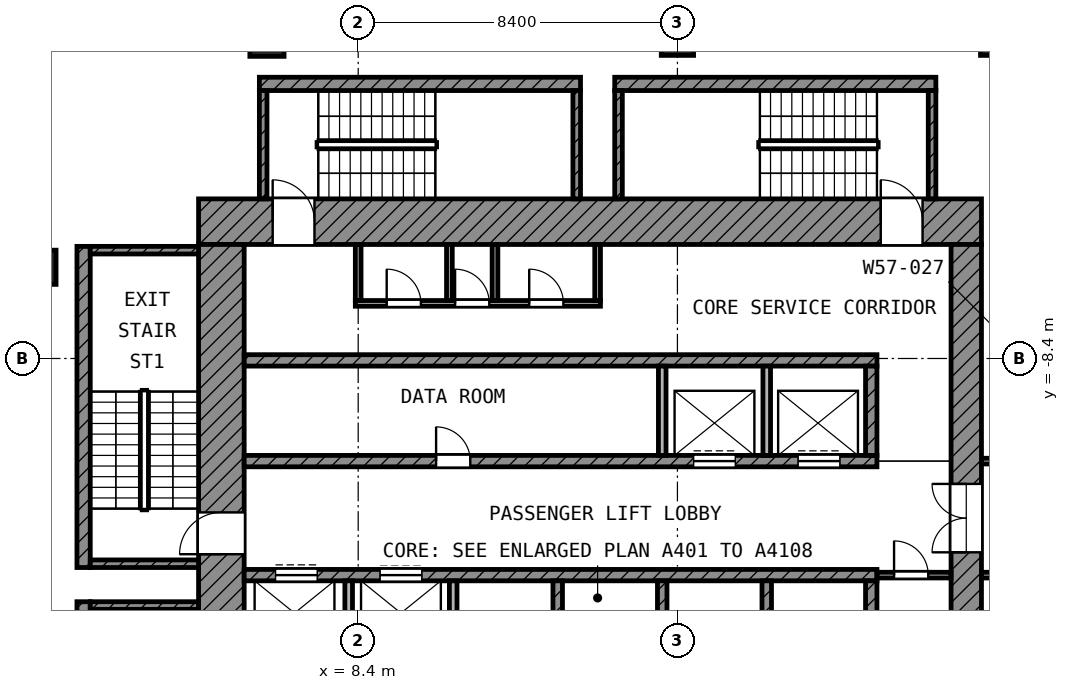
"""IFC4 building model, lengths in metres.
Left out: names, types, materials, properties, quantities, classifications, styles, units other than length and angle.
Written with IfcOpenShell. Run it as: python <this file> out.ifc"""

import sys

from ifc_helpers import new_model, si_unit, direction, frame, frame_2d, origin, origin_2d, place, context, subcontext, project, spatial, rectangle, extrude, element, fill, save


model = new_model("IFC4")
c1 = context("Model", 3, precision=1e-05, world=origin(), true_north=direction((0.0, 1.0)))
c2 = subcontext(c1, "Body", "Model", "MODEL_VIEW")
j1 = project(units=[si_unit("LENGTHUNIT", "METRE"), si_unit("PLANEANGLEUNIT", "RADIAN")], contexts=[c1])
p1 = place(None, origin())
s1 = spatial("IfcSite", under=j1, at=p1, CompositionType="ELEMENT")
p2 = place(p1, origin())
s2 = spatial("IfcBuilding", under=s1, at=p2, CompositionType="ELEMENT")
p3 = place(p2, frame((0.0, 0.0, 247.4)))
s3 = spatial("IfcBuildingStorey", under=s2, at=p3, CompositionType="ELEMENT", Elevation=247.4)
p4 = place(p3, frame((6.0, 0.0, 0.0), z_axis=(0.0, 0.0, 1.0), x_axis=(1.0, 0.0, 0.0)))
e1 = element("IfcColumn", 1, at=p4, inside=s3, PredefinedType="COLUMN", context=c2, shape_type="SweptSolid", body=[
    extrude(rectangle(XDim=0.9, YDim=0.9, at=origin_2d()), origin(), (0.0, 0.0, 1.0), 4.2),
])
for number, where, z_axis, x_axis in (
    (2, (16.8, 0.0, 0.0), (0.0, 0.0, 1.0), (1.0, 0.0, 0.0)),
    (3, (25.2, 0.0, 0.0), (0.0, 0.0, 1.0), (1.0, 0.0, 0.0)),
):
    element("IfcColumn", number, at=place(p3, frame(where, z_axis=z_axis, x_axis=x_axis)), inside=s3, PredefinedType="COLUMN", context=c2, shape_type="SweptSolid", body=[
        extrude(rectangle(XDim=0.85, YDim=0.85, at=origin_2d()), origin(), (0.0, 0.0, 1.0), 4.2),
    ])
p5 = place(p3, frame((0.0, -6.0, 0.0), z_axis=(0.0, 0.0, 1.0), x_axis=(1.0, 0.0, 0.0)))
e4 = element("IfcColumn", 4, at=p5, inside=s3, PredefinedType="COLUMN", context=c2, shape_type="SweptSolid", body=[
    extrude(rectangle(XDim=0.9, YDim=0.9, at=origin_2d()), origin(), (0.0, 0.0, 1.0), 4.2),
])
p6 = place(p3, frame((4.2, -4.8, 0.0), z_axis=(0.0, 0.0, 1.0), x_axis=(1.0, 0.0, 0.0)))
e5 = element("IfcWall", 5, at=p6, inside=s3, PredefinedType="SHEAR", context=c2, shape_type="SweptSolid", body=[
    extrude(rectangle(XDim=20.6, YDim=1.2, at=frame_2d((10.3, 0.0))), origin(), (0.0, 0.0, 1.0), 3.6),
])
p7 = place(p6, frame((1.95, 0.0, 0.0)))
e6 = element("IfcOpeningElement", 6, at=p7, cuts=e5, PredefinedType="OPENING", context=c2, shape_type="SweptSolid", body=[
    extrude(rectangle(XDim=1.1, YDim=2.1, at=frame_2d((0.55, 1.05))), frame((0.0, 0.61, 0.0), z_axis=(0.0, -1.0, 0.0), x_axis=(1.0, 0.0, 0.0)), (0.0, 0.0, 1.0), 1.22),
])
p8 = place(p6, frame((17.95, 0.0, 0.0)))
e7 = element("IfcOpeningElement", 7, at=p8, cuts=e5, PredefinedType="OPENING", context=c2, shape_type="SweptSolid", body=[
    extrude(rectangle(XDim=1.1, YDim=2.1, at=frame_2d((0.55, 1.05))), frame((0.0, 0.61, 0.0), z_axis=(0.0, -1.0, 0.0), x_axis=(1.0, 0.0, 0.0)), (0.0, 0.0, 1.0), 1.22),
])
p9 = place(p3, frame((4.8, -24.8, 0.0), z_axis=(0.0, 0.0, 1.0), x_axis=(0.0, 1.0, 0.0)))
e8 = element("IfcWall", 8, at=p9, inside=s3, PredefinedType="SHEAR", context=c2, shape_type="SweptSolid", body=[
    extrude(rectangle(XDim=19.4, YDim=1.2, at=frame_2d((9.7, 0.0))), origin(), (0.0, 0.0, 1.0), 3.6),
])
p10 = place(p9, frame((11.25, 0.0, 0.0)))
e9 = element("IfcOpeningElement", 9, at=p10, cuts=e8, PredefinedType="OPENING", context=c2, shape_type="SweptSolid", body=[
    extrude(rectangle(XDim=1.1, YDim=2.1, at=frame_2d((0.55, 1.05))), frame((0.0, 0.61, 0.0), z_axis=(0.0, -1.0, 0.0), x_axis=(1.0, 0.0, 0.0)), (0.0, 0.0, 1.0), 1.22),
])
p11 = place(p9, frame((1.95, 0.0, 0.0)))
e10 = element("IfcOpeningElement", 10, at=p11, cuts=e8, PredefinedType="OPENING", context=c2, shape_type="SweptSolid", body=[
    extrude(rectangle(XDim=1.1, YDim=2.1, at=frame_2d((0.55, 1.05))), frame((0.0, 0.61, 0.0), z_axis=(0.0, -1.0, 0.0), x_axis=(1.0, 0.0, 0.0)), (0.0, 0.0, 1.0), 1.22),
])
p12 = place(p3, frame((24.4, -24.0, 0.0), z_axis=(0.0, 0.0, 1.0), x_axis=(0.0, 1.0, 0.0)))
e11 = element("IfcWall", 11, at=p12, inside=s3, PredefinedType="SHEAR", context=c2, shape_type="SweptSolid", body=[
    extrude(rectangle(XDim=18.6, YDim=0.8, at=frame_2d((9.3, 0.0))), origin(), (0.0, 0.0, 1.0), 3.6),
])
p13 = place(p12, frame((10.5, 0.0, 0.0)))
e12 = element("IfcOpeningElement", 12, at=p13, cuts=e11, PredefinedType="OPENING", context=c2, shape_type="SweptSolid", body=[
    extrude(rectangle(XDim=1.8, YDim=2.1, at=frame_2d((0.9, 1.05))), frame((0.0, 0.41, 0.0), z_axis=(0.0, -1.0, 0.0), x_axis=(1.0, 0.0, 0.0)), (0.0, 0.0, 1.0), 0.82),
])
p14 = place(p3, frame((5.4, -8.45, 0.0), z_axis=(0.0, 0.0, 1.0), x_axis=(1.0, 0.0, 0.0)))
e13 = element("IfcWall", 13, at=p14, inside=s3, PredefinedType="SHEAR", context=c2, shape_type="SweptSolid", body=[
    extrude(rectangle(XDim=16.65, YDim=0.3, at=frame_2d((8.325, 0.0))), origin(), (0.0, 0.0, 1.0), 3.6),
])
p15 = place(p3, frame((5.4, -11.1, 0.0), z_axis=(0.0, 0.0, 1.0), x_axis=(1.0, 0.0, 0.0)))
e14 = element("IfcWall", 14, at=p15, inside=s3, PredefinedType="SHEAR", context=c2, shape_type="SweptSolid", body=[
    extrude(rectangle(XDim=16.65, YDim=0.3, at=frame_2d((8.325, 0.0))), origin(), (0.0, 0.0, 1.0), 3.6),
])
p16 = place(p15, frame((11.825, 0.0, 0.0)))
e15 = element("IfcOpeningElement", 15, at=p16, cuts=e14, PredefinedType="OPENING", context=c2, shape_type="SweptSolid", body=[
    extrude(rectangle(XDim=1.1, YDim=2.1, at=frame_2d((0.55, 1.05))), frame((0.0, 0.16, 0.0), z_axis=(0.0, -1.0, 0.0), x_axis=(1.0, 0.0, 0.0)), (0.0, 0.0, 1.0), 0.32),
])
p17 = place(p15, frame((14.575, 0.0, 0.0)))
e16 = element("IfcOpeningElement", 16, at=p17, cuts=e14, PredefinedType="OPENING", context=c2, shape_type="SweptSolid", body=[
    extrude(rectangle(XDim=1.1, YDim=2.1, at=frame_2d((0.55, 1.05))), frame((0.0, 0.16, 0.0), z_axis=(0.0, -1.0, 0.0), x_axis=(1.0, 0.0, 0.0)), (0.0, 0.0, 1.0), 0.32),
])
p18 = place(p15, frame((5.05, 0.0, 0.0)))
e17 = element("IfcOpeningElement", 17, at=p18, cuts=e14, PredefinedType="OPENING", context=c2, shape_type="SweptSolid", body=[
    extrude(rectangle(XDim=0.9, YDim=2.1, at=frame_2d((0.45, 1.05))), frame((0.0, 0.16, 0.0), z_axis=(0.0, -1.0, 0.0), x_axis=(1.0, 0.0, 0.0)), (0.0, 0.0, 1.0), 0.32),
])
p19 = place(p3, frame((5.4, -14.1, 0.0), z_axis=(0.0, 0.0, 1.0), x_axis=(1.0, 0.0, 0.0)))
e18 = element("IfcWall", 18, at=p19, inside=s3, PredefinedType="SHEAR", context=c2, shape_type="SweptSolid", body=[
    extrude(rectangle(XDim=16.65, YDim=0.3, at=frame_2d((8.325, 0.0))), origin(), (0.0, 0.0, 1.0), 3.6),
])
p20 = place(p19, frame((0.825, 0.0, 0.0)))
e19 = element("IfcOpeningElement", 19, at=p20, cuts=e18, PredefinedType="OPENING", context=c2, shape_type="SweptSolid", body=[
    extrude(rectangle(XDim=1.1, YDim=2.1, at=frame_2d((0.55, 1.05))), frame((0.0, 0.16, 0.0), z_axis=(0.0, -1.0, 0.0), x_axis=(1.0, 0.0, 0.0)), (0.0, 0.0, 1.0), 0.32),
])
p21 = place(p19, frame((3.575, 0.0, 0.0)))
e20 = element("IfcOpeningElement", 20, at=p21, cuts=e18, PredefinedType="OPENING", context=c2, shape_type="SweptSolid", body=[
    extrude(rectangle(XDim=1.1, YDim=2.1, at=frame_2d((0.55, 1.05))), frame((0.0, 0.16, 0.0), z_axis=(0.0, -1.0, 0.0), x_axis=(1.0, 0.0, 0.0)), (0.0, 0.0, 1.0), 0.32),
])
p22 = place(p3, frame((21.9, -10.95, 0.0), z_axis=(0.0, 0.0, 1.0), x_axis=(0.0, 1.0, 0.0)))
e21 = element("IfcWall", 21, at=p22, inside=s3, PredefinedType="SHEAR", context=c2, shape_type="SweptSolid", body=[
    extrude(rectangle(XDim=2.35, YDim=0.3, at=frame_2d((1.175, 0.0))), origin(), (0.0, 0.0, 1.0), 3.6),
])
p23 = place(p3, frame((21.9, -16.6, 0.0), z_axis=(0.0, 0.0, 1.0), x_axis=(0.0, 1.0, 0.0)))
e22 = element("IfcWall", 22, at=p23, inside=s3, PredefinedType="SHEAR", context=c2, shape_type="SweptSolid", body=[
    extrude(rectangle(XDim=2.35, YDim=0.3, at=frame_2d((1.175, 0.0))), origin(), (0.0, 0.0, 1.0), 3.6),
])
for number, where, z_axis, x_axis in (
    (23, (16.4, -10.95, 0.0), (0.0, 0.0, 1.0), (0.0, 1.0, 0.0)),
    (24, (19.15, -10.95, 0.0), (0.0, 0.0, 1.0), (0.0, 1.0, 0.0)),
):
    element("IfcWall", number, at=place(p3, frame(where, z_axis=z_axis, x_axis=x_axis)), inside=s3, PredefinedType="PARTITIONING", context=c2, shape_type="SweptSolid", body=[
        extrude(rectangle(XDim=2.35, YDim=0.2, at=frame_2d((1.175, 0.0))), origin(), (0.0, 0.0, 1.0), 3.6),
    ])
for number, where, z_axis, x_axis in (
    (25, (8.15, -16.6, 0.0), (0.0, 0.0, 1.0), (0.0, 1.0, 0.0)),
    (26, (10.9, -16.6, 0.0), (0.0, 0.0, 1.0), (0.0, 1.0, 0.0)),
):
    element("IfcWall", number, at=place(p3, frame(where, z_axis=z_axis, x_axis=x_axis)), inside=s3, PredefinedType="PARTITIONING", context=c2, shape_type="SweptSolid", body=[
        extrude(rectangle(XDim=2.35, YDim=0.2, at=frame_2d((1.175, 0.0))), origin(), (0.0, 0.0, 1.0), 3.6),
    ])
for number, where, z_axis, x_axis in (
    (27, (13.65, -16.6, 0.0), (0.0, 0.0, 1.0), (0.0, 1.0, 0.0)),
    (28, (16.4, -16.6, 0.0), (0.0, 0.0, 1.0), (0.0, 1.0, 0.0)),
    (29, (19.15, -16.6, 0.0), (0.0, 0.0, 1.0), (0.0, 1.0, 0.0)),
):
    element("IfcWall", number, at=place(p3, frame(where, z_axis=z_axis, x_axis=x_axis)), inside=s3, PredefinedType="SHEAR", context=c2, shape_type="SweptSolid", body=[
        extrude(rectangle(XDim=2.35, YDim=0.25, at=frame_2d((1.175, 0.0))), origin(), (0.0, 0.0, 1.0), 3.6),
    ])
p24 = place(p3, frame((22.05, -14.1, 0.0), z_axis=(0.0, 0.0, 1.0), x_axis=(1.0, 0.0, 0.0)))
e30 = element("IfcWall", 30, at=p24, inside=s3, PredefinedType="PARTITIONING", context=c2, shape_type="SweptSolid", body=[
    extrude(rectangle(XDim=1.95, YDim=0.15, at=frame_2d((0.975, 0.0))), origin(), (0.0, 0.0, 1.0), 3.6),
])
p25 = place(p24, frame((0.45, 0.0, 0.0)))
e31 = element("IfcOpeningElement", 31, at=p25, cuts=e30, PredefinedType="OPENING", context=c2, shape_type="SweptSolid", body=[
    extrude(rectangle(XDim=0.9, YDim=2.1, at=frame_2d((0.45, 1.05))), frame((0.0, 0.085, 0.0), z_axis=(0.0, -1.0, 0.0), x_axis=(1.0, 0.0, 0.0)), (0.0, 0.0, 1.0), 0.17),
])
p26 = place(p3, frame((8.325, -6.95, 0.0), z_axis=(0.0, 0.0, 1.0), x_axis=(1.0, 0.0, 0.0)))
e32 = element("IfcWall", 32, at=p26, inside=s3, PredefinedType="PARTITIONING", context=c2, shape_type="SweptSolid", body=[
    extrude(rectangle(XDim=6.45, YDim=0.15, at=frame_2d((3.225, 0.0))), origin(), (0.0, 0.0, 1.0), 3.6),
])
p27 = place(p26, frame((0.825, 0.0, 0.0)))
e33 = element("IfcOpeningElement", 33, at=p27, cuts=e32, PredefinedType="OPENING", context=c2, shape_type="SweptSolid", body=[
    extrude(rectangle(XDim=0.9, YDim=2.1, at=frame_2d((0.45, 1.05))), frame((0.0, 0.085, 0.0), z_axis=(0.0, -1.0, 0.0), x_axis=(1.0, 0.0, 0.0)), (0.0, 0.0, 1.0), 0.17),
])
p28 = place(p26, frame((2.625, 0.0, 0.0)))
e34 = element("IfcOpeningElement", 34, at=p28, cuts=e32, PredefinedType="OPENING", context=c2, shape_type="SweptSolid", body=[
    extrude(rectangle(XDim=0.9, YDim=2.1, at=frame_2d((0.45, 1.05))), frame((0.0, 0.085, 0.0), z_axis=(0.0, -1.0, 0.0), x_axis=(1.0, 0.0, 0.0)), (0.0, 0.0, 1.0), 0.17),
])
p29 = place(p26, frame((4.575, 0.0, 0.0)))
e35 = element("IfcOpeningElement", 35, at=p29, cuts=e32, PredefinedType="OPENING", context=c2, shape_type="SweptSolid", body=[
    extrude(rectangle(XDim=0.9, YDim=2.1, at=frame_2d((0.45, 1.05))), frame((0.0, 0.085, 0.0), z_axis=(0.0, -1.0, 0.0), x_axis=(1.0, 0.0, 0.0)), (0.0, 0.0, 1.0), 0.17),
])
for number, where, z_axis, x_axis in (
    (36, (8.4, -6.875, 0.0), (0.0, 0.0, 1.0), (0.0, 1.0, 0.0)),
    (37, (10.8, -6.875, 0.0), (0.0, 0.0, 1.0), (0.0, 1.0, 0.0)),
    (38, (12.0, -6.875, 0.0), (0.0, 0.0, 1.0), (0.0, 1.0, 0.0)),
    (39, (14.7, -6.875, 0.0), (0.0, 0.0, 1.0), (0.0, 1.0, 0.0)),
):
    element("IfcWall", number, at=place(p3, frame(where, z_axis=z_axis, x_axis=x_axis)), inside=s3, PredefinedType="PARTITIONING", context=c2, shape_type="SweptSolid", body=[
        extrude(rectangle(XDim=1.475, YDim=0.15, at=frame_2d((0.738, 0.0))), origin(), (0.0, 0.0, 1.0), 3.6),
    ])
p30 = place(p3, frame((1.175, -13.9, 0.0), z_axis=(0.0, 0.0, 1.0), x_axis=(0.0, 1.0, 0.0)))
e40 = element("IfcWall", 40, at=p30, inside=s3, PredefinedType="SHEAR", context=c2, shape_type="SweptSolid", body=[
    extrude(rectangle(XDim=8.45, YDim=0.35, at=frame_2d((4.225, 0.0))), origin(), (0.0, 0.0, 1.0), 3.6),
])
for number, where, z_axis, x_axis in (
    (41, (1.35, -5.55, 0.0), (0.0, 0.0, 1.0), (1.0, 0.0, 0.0)),
    (42, (1.35, -13.8, 0.0), (0.0, 0.0, 1.0), (1.0, 0.0, 0.0)),
):
    element("IfcWall", number, at=place(p3, frame(where, z_axis=z_axis, x_axis=x_axis)), inside=s3, PredefinedType="SHEAR", context=c2, shape_type="SweptSolid", body=[
        extrude(rectangle(XDim=2.85, YDim=0.2, at=frame_2d((1.425, 0.0))), origin(), (0.0, 0.0, 1.0), 3.6),
    ])
p31 = place(p3, frame((1.175, -23.25, 0.0), z_axis=(0.0, 0.0, 1.0), x_axis=(0.0, 1.0, 0.0)))
e43 = element("IfcWall", 43, at=p31, inside=s3, PredefinedType="SHEAR", context=c2, shape_type="SweptSolid", body=[
    extrude(rectangle(XDim=8.45, YDim=0.35, at=frame_2d((4.225, 0.0))), origin(), (0.0, 0.0, 1.0), 3.6),
])
p32 = place(p3, frame((1.35, -14.9, 0.0), z_axis=(0.0, 0.0, 1.0), x_axis=(1.0, 0.0, 0.0)))
e44 = element("IfcWall", 44, at=p32, inside=s3, PredefinedType="SHEAR", context=c2, shape_type="SweptSolid", body=[
    extrude(rectangle(XDim=2.85, YDim=0.2, at=frame_2d((1.425, 0.0))), origin(), (0.0, 0.0, 1.0), 3.6),
])
p33 = place(p3, frame((5.8, -1.175, 0.0), z_axis=(0.0, 0.0, 1.0), x_axis=(1.0, 0.0, 0.0)))
e45 = element("IfcWall", 45, at=p33, inside=s3, PredefinedType="SHEAR", context=c2, shape_type="SweptSolid", body=[
    extrude(rectangle(XDim=8.45, YDim=0.35, at=frame_2d((4.225, 0.0))), origin(), (0.0, 0.0, 1.0), 3.6),
])
for number, where, z_axis, x_axis in (
    (46, (5.9, -4.2, 0.0), (0.0, 0.0, 1.0), (0.0, 1.0, 0.0)),
    (47, (14.15, -4.2, 0.0), (0.0, 0.0, 1.0), (0.0, 1.0, 0.0)),
):
    element("IfcWall", number, at=place(p3, frame(where, z_axis=z_axis, x_axis=x_axis)), inside=s3, PredefinedType="SHEAR", context=c2, shape_type="SweptSolid", body=[
        extrude(rectangle(XDim=2.85, YDim=0.2, at=frame_2d((1.425, 0.0))), origin(), (0.0, 0.0, 1.0), 3.6),
    ])
p34 = place(p3, frame((15.15, -1.175, 0.0), z_axis=(0.0, 0.0, 1.0), x_axis=(1.0, 0.0, 0.0)))
e48 = element("IfcWall", 48, at=p34, inside=s3, PredefinedType="SHEAR", context=c2, shape_type="SweptSolid", body=[
    extrude(rectangle(XDim=8.45, YDim=0.35, at=frame_2d((4.225, 0.0))), origin(), (0.0, 0.0, 1.0), 3.6),
])
for number, where, z_axis, x_axis in (
    (49, (15.25, -4.2, 0.0), (0.0, 0.0, 1.0), (0.0, 1.0, 0.0)),
    (50, (23.5, -4.2, 0.0), (0.0, 0.0, 1.0), (0.0, 1.0, 0.0)),
):
    element("IfcWall", number, at=place(p3, frame(where, z_axis=z_axis, x_axis=x_axis)), inside=s3, PredefinedType="SHEAR", context=c2, shape_type="SweptSolid", body=[
        extrude(rectangle(XDim=2.85, YDim=0.2, at=frame_2d((1.425, 0.0))), origin(), (0.0, 0.0, 1.0), 3.6),
    ])
p35 = place(p3, frame((24.8, -14.1, 0.0), z_axis=(0.0, 0.0, 1.0), x_axis=(1.0, 0.0, 0.0)))
e51 = element("IfcWall", 51, at=p35, inside=s3, PredefinedType="PARTITIONING", context=c2, shape_type="SweptSolid", body=[
    extrude(rectangle(XDim=4.525, YDim=0.15, at=frame_2d((2.262, 0.0))), origin(), (0.0, 0.0, 1.0), 3.6),
])
p36 = place(p35, frame((1.75, 0.0, 0.0)))
e52 = element("IfcOpeningElement", 52, at=p36, cuts=e51, PredefinedType="OPENING", context=c2, shape_type="SweptSolid", body=[
    extrude(rectangle(XDim=1.5, YDim=2.1, at=frame_2d((0.75, 1.05))), frame((0.0, 0.085, 0.0), z_axis=(0.0, -1.0, 0.0), x_axis=(1.0, 0.0, 0.0)), (0.0, 0.0, 1.0), 0.17),
])
p37 = place(p3, frame((24.8, -11.1, 0.0), z_axis=(0.0, 0.0, 1.0), x_axis=(1.0, 0.0, 0.0)))
e53 = element("IfcWall", 53, at=p37, inside=s3, PredefinedType="PARTITIONING", context=c2, shape_type="SweptSolid", body=[
    extrude(rectangle(XDim=4.6, YDim=0.15, at=frame_2d((2.3, 0.0))), origin(), (0.0, 0.0, 1.0), 3.6),
])
p38 = place(p37, frame((1.9, 0.0, 0.0)))
e54 = element("IfcOpeningElement", 54, at=p38, cuts=e53, PredefinedType="OPENING", context=c2, shape_type="SweptSolid", body=[
    extrude(rectangle(XDim=1.2, YDim=2.1, at=frame_2d((0.6, 1.05))), frame((0.0, 0.085, 0.0), z_axis=(0.0, -1.0, 0.0), x_axis=(1.0, 0.0, 0.0)), (0.0, 0.0, 1.0), 0.17),
])
p39 = place(p16, origin())
e55 = element("IfcDoor", 55, at=p39, inside=s3, OperationType="DOUBLE_DOOR_SLIDING", PredefinedType="DOOR", context=c2, shape_type="SweptSolid", body=[
    extrude(rectangle(XDim=1.1, YDim=2.1, at=frame_2d((0.55, 1.05))), frame((0.0, 0.025, 0.0), z_axis=(0.0, -1.0, 0.0), x_axis=(1.0, 0.0, 0.0)), (0.0, 0.0, 1.0), 0.05),
])
fill(e15, e55)
p40 = place(p17, origin())
e56 = element("IfcDoor", 56, at=p40, inside=s3, OperationType="DOUBLE_DOOR_SLIDING", PredefinedType="DOOR", context=c2, shape_type="SweptSolid", body=[
    extrude(rectangle(XDim=1.1, YDim=2.1, at=frame_2d((0.55, 1.05))), frame((0.0, 0.025, 0.0), z_axis=(0.0, -1.0, 0.0), x_axis=(1.0, 0.0, 0.0)), (0.0, 0.0, 1.0), 0.05),
])
fill(e16, e56)
p41 = place(p20, origin())
e57 = element("IfcDoor", 57, at=p41, inside=s3, OperationType="DOUBLE_DOOR_SLIDING", PredefinedType="DOOR", context=c2, shape_type="SweptSolid", body=[
    extrude(rectangle(XDim=1.1, YDim=2.1, at=frame_2d((0.55, 1.05))), frame((0.0, 0.025, 0.0), z_axis=(0.0, -1.0, 0.0), x_axis=(1.0, 0.0, 0.0)), (0.0, 0.0, 1.0), 0.05),
])
fill(e19, e57)
p42 = place(p21, origin())
e58 = element("IfcDoor", 58, at=p42, inside=s3, OperationType="DOUBLE_DOOR_SLIDING", PredefinedType="DOOR", context=c2, shape_type="SweptSolid", body=[
    extrude(rectangle(XDim=1.1, YDim=2.1, at=frame_2d((0.55, 1.05))), frame((0.0, 0.025, 0.0), z_axis=(0.0, -1.0, 0.0), x_axis=(1.0, 0.0, 0.0)), (0.0, 0.0, 1.0), 0.05),
])
fill(e20, e58)
p43 = place(p10, origin())
e59 = element("IfcDoor", 59, at=p43, inside=s3, OperationType="SINGLE_SWING_LEFT", PredefinedType="DOOR", context=c2, shape_type="SweptSolid", body=[
    extrude(rectangle(XDim=1.1, YDim=2.1, at=frame_2d((0.55, 1.05))), frame((0.0, 0.025, 0.0), z_axis=(0.0, -1.0, 0.0), x_axis=(1.0, 0.0, 0.0)), (0.0, 0.0, 1.0), 0.05),
])
fill(e9, e59)
p44 = place(p7, origin())
e60 = element("IfcDoor", 60, at=p44, inside=s3, OperationType="SINGLE_SWING_LEFT", PredefinedType="DOOR", context=c2, shape_type="SweptSolid", body=[
    extrude(rectangle(XDim=1.1, YDim=2.1, at=frame_2d((0.55, 1.05))), frame((0.0, 0.025, 0.0), z_axis=(0.0, -1.0, 0.0), x_axis=(1.0, 0.0, 0.0)), (0.0, 0.0, 1.0), 0.05),
])
fill(e6, e60)
p45 = place(p8, origin())
e61 = element("IfcDoor", 61, at=p45, inside=s3, OperationType="SINGLE_SWING_LEFT", PredefinedType="DOOR", context=c2, shape_type="SweptSolid", body=[
    extrude(rectangle(XDim=1.1, YDim=2.1, at=frame_2d((0.55, 1.05))), frame((0.0, 0.025, 0.0), z_axis=(0.0, -1.0, 0.0), x_axis=(1.0, 0.0, 0.0)), (0.0, 0.0, 1.0), 0.05),
])
fill(e7, e61)
p46 = place(p13, origin())
e62 = element("IfcDoor", 62, at=p46, inside=s3, OperationType="DOUBLE_DOOR_SINGLE_SWING", PredefinedType="DOOR", context=c2, shape_type="SweptSolid", body=[
    extrude(rectangle(XDim=1.8, YDim=2.1, at=frame_2d((0.9, 1.05))), frame((0.0, 0.025, 0.0), z_axis=(0.0, -1.0, 0.0), x_axis=(1.0, 0.0, 0.0)), (0.0, 0.0, 1.0), 0.05),
])
fill(e12, e62)
p47 = place(p27, origin())
e63 = element("IfcDoor", 63, at=p47, inside=s3, OperationType="SINGLE_SWING_LEFT", PredefinedType="DOOR", context=c2, shape_type="SweptSolid", body=[
    extrude(rectangle(XDim=0.9, YDim=2.1, at=frame_2d((0.45, 1.05))), frame((0.0, 0.025, 0.0), z_axis=(0.0, -1.0, 0.0), x_axis=(1.0, 0.0, 0.0)), (0.0, 0.0, 1.0), 0.05),
])
fill(e33, e63)
p48 = place(p28, origin())
e64 = element("IfcDoor", 64, at=p48, inside=s3, OperationType="SINGLE_SWING_LEFT", PredefinedType="DOOR", context=c2, shape_type="SweptSolid", body=[
    extrude(rectangle(XDim=0.9, YDim=2.1, at=frame_2d((0.45, 1.05))), frame((0.0, 0.025, 0.0), z_axis=(0.0, -1.0, 0.0), x_axis=(1.0, 0.0, 0.0)), (0.0, 0.0, 1.0), 0.05),
])
fill(e34, e64)
p49 = place(p29, origin())
e65 = element("IfcDoor", 65, at=p49, inside=s3, OperationType="SINGLE_SWING_LEFT", PredefinedType="DOOR", context=c2, shape_type="SweptSolid", body=[
    extrude(rectangle(XDim=0.9, YDim=2.1, at=frame_2d((0.45, 1.05))), frame((0.0, 0.025, 0.0), z_axis=(0.0, -1.0, 0.0), x_axis=(1.0, 0.0, 0.0)), (0.0, 0.0, 1.0), 0.05),
])
fill(e35, e65)
p50 = place(p25, origin())
e66 = element("IfcDoor", 66, at=p50, inside=s3, OperationType="SINGLE_SWING_LEFT", PredefinedType="DOOR", context=c2, shape_type="SweptSolid", body=[
    extrude(rectangle(XDim=0.9, YDim=2.1, at=frame_2d((0.45, 1.05))), frame((0.0, 0.025, 0.0), z_axis=(0.0, -1.0, 0.0), x_axis=(1.0, 0.0, 0.0)), (0.0, 0.0, 1.0), 0.05),
])
fill(e31, e66)
p51 = place(p18, origin())
e67 = element("IfcDoor", 67, at=p51, inside=s3, OperationType="SINGLE_SWING_LEFT", PredefinedType="DOOR", context=c2, shape_type="SweptSolid", body=[
    extrude(rectangle(XDim=0.9, YDim=2.1, at=frame_2d((0.45, 1.05))), frame((0.0, 0.025, 0.0), z_axis=(0.0, -1.0, 0.0), x_axis=(1.0, 0.0, 0.0)), (0.0, 0.0, 1.0), 0.05),
])
fill(e17, e67)
save(model, sys.argv[1])
